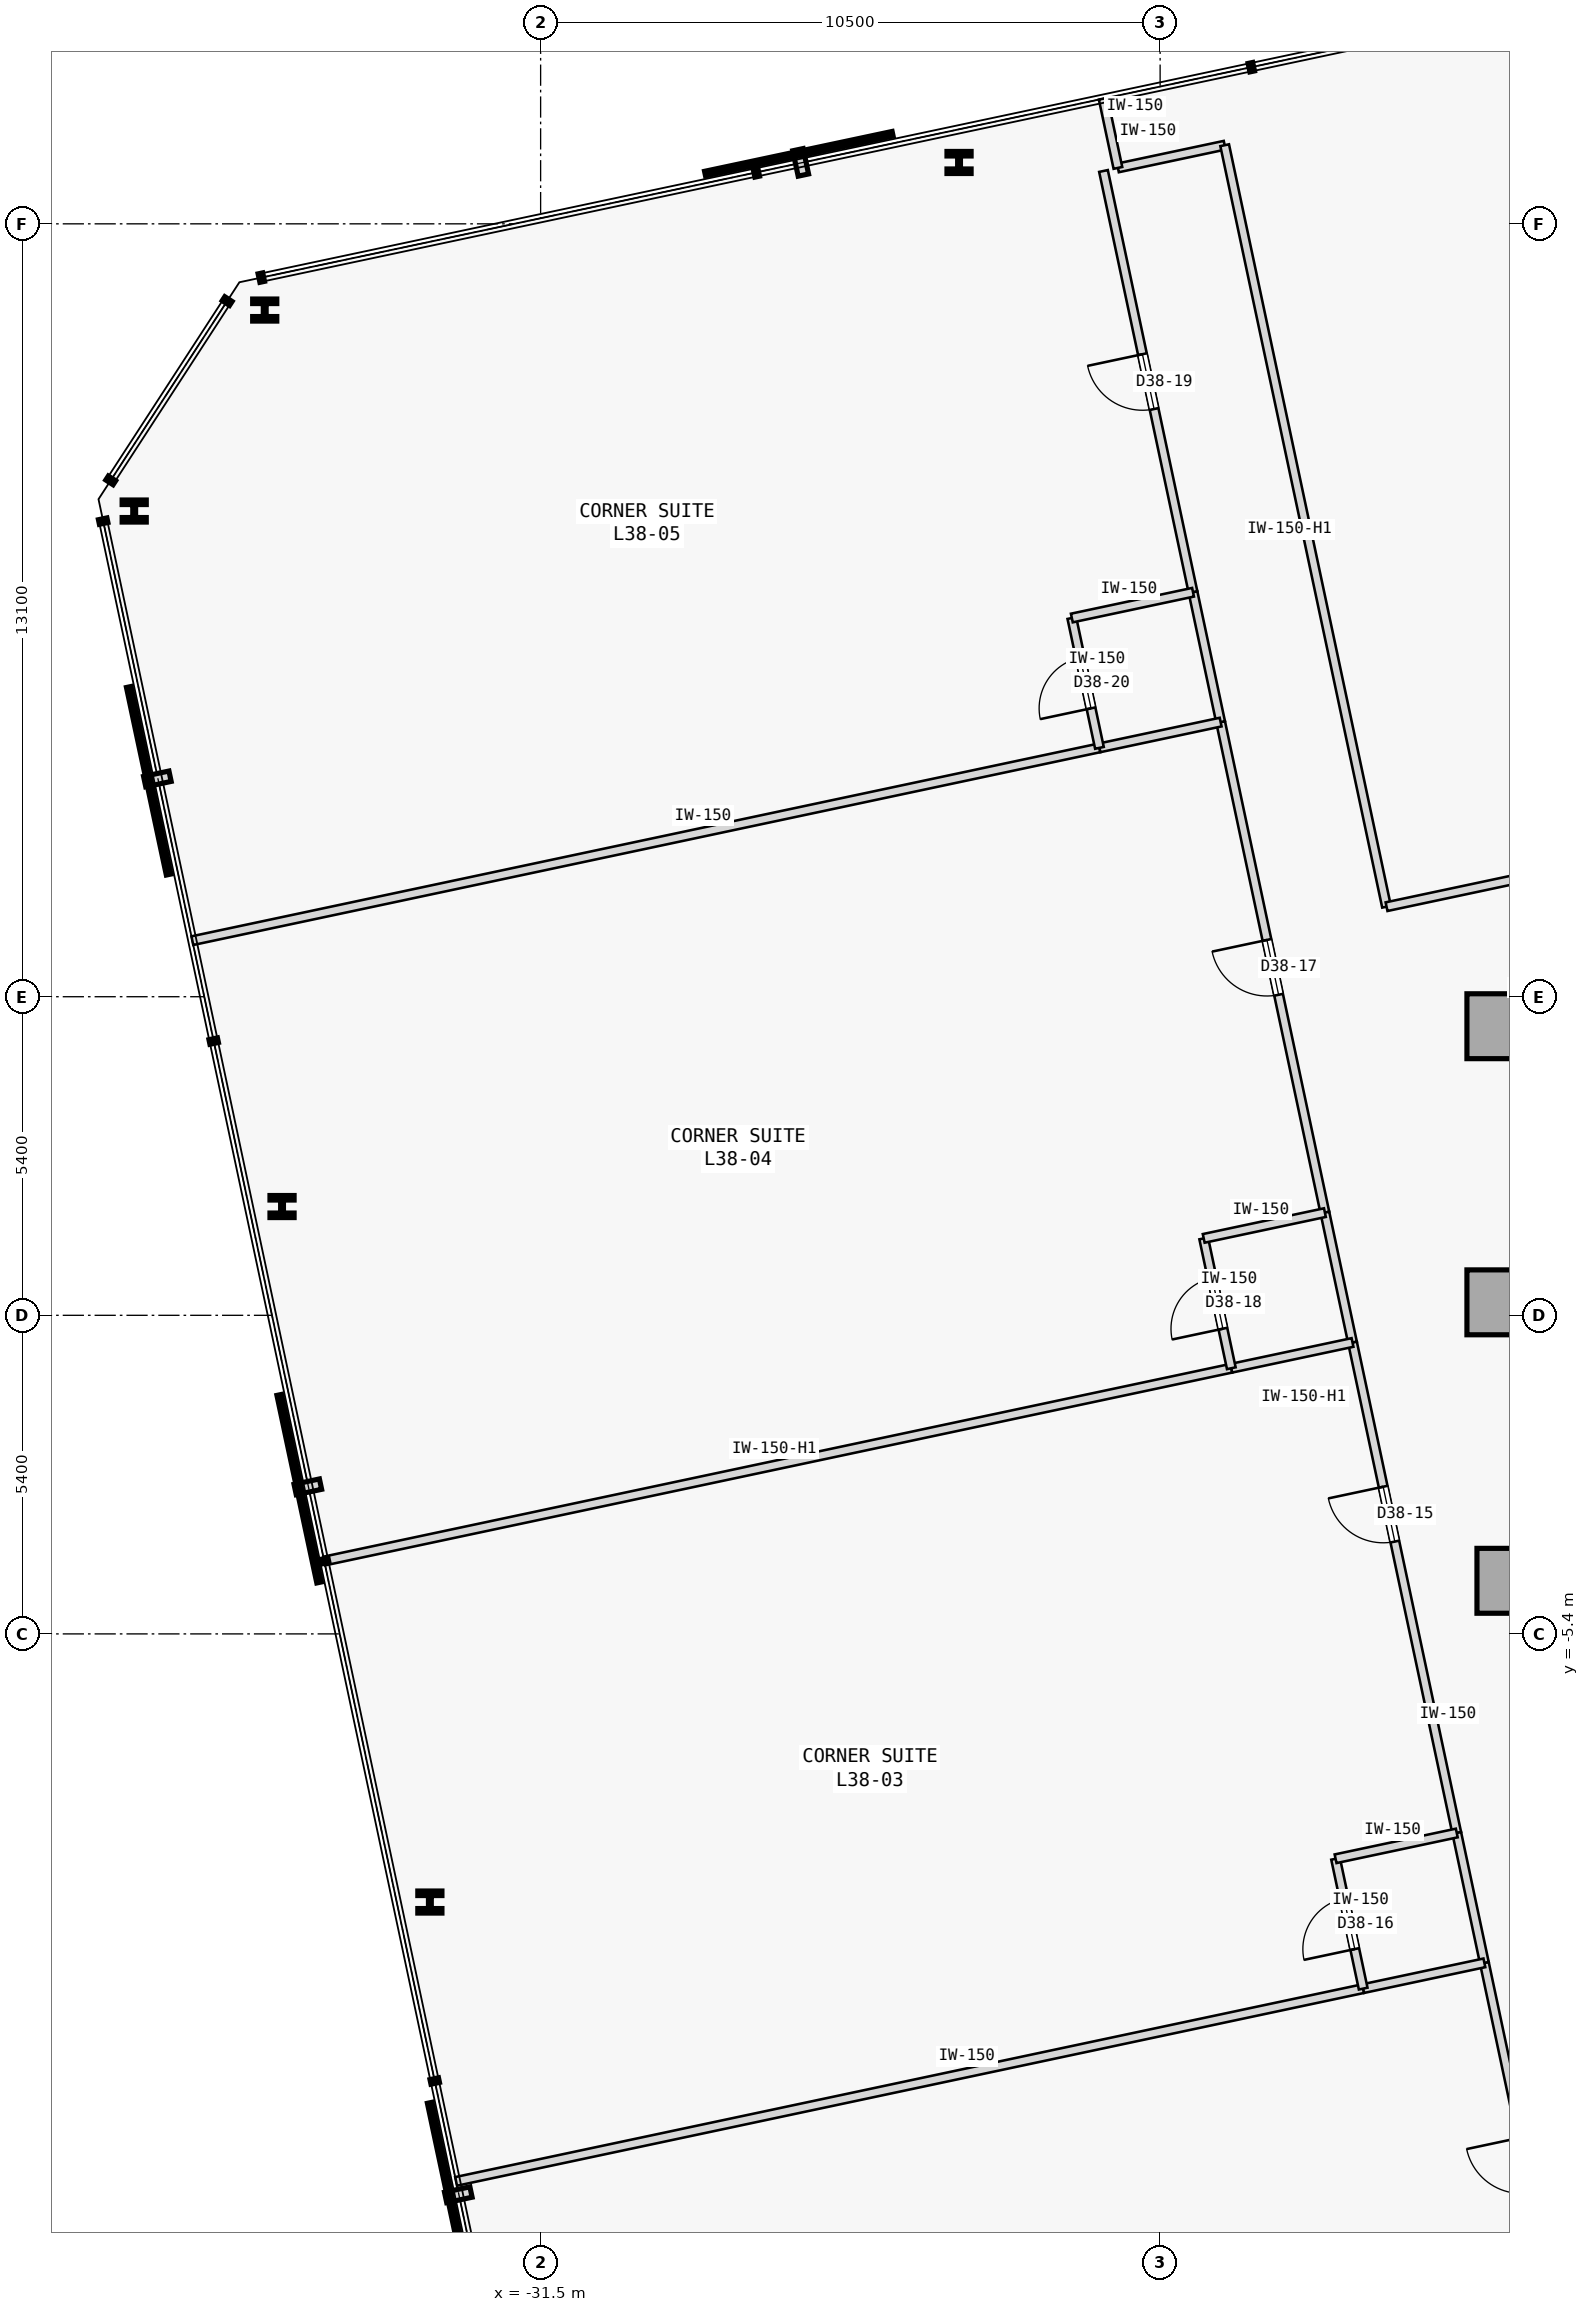
"""IFC4 building model, lengths in metres.
Left out: names, types, materials, properties, quantities, classifications, styles, units other than length and angle.
Written with IfcOpenShell. Run it as: python <this file> out.ifc"""

import sys

from ifc_helpers import new_model, si_unit, direction, frame, frame_2d, origin, origin_2d, place, context, subcontext, project, spatial, rectangle, i_section, extrude, element, fill, save


model = new_model("IFC4")
c1 = context("Model", 3, precision=1e-05, world=origin(), true_north=direction((0.0, 1.0)))
c2 = subcontext(c1, "Body", "Model", "MODEL_VIEW")
j1 = project(units=[si_unit("LENGTHUNIT", "METRE"), si_unit("PLANEANGLEUNIT", "RADIAN")], contexts=[c1])
p1 = place(None, origin())
s1 = spatial("IfcSite", under=j1, at=p1, CompositionType="ELEMENT")
p2 = place(p1, origin())
s2 = spatial("IfcBuilding", under=s1, at=p2, CompositionType="ELEMENT")
p3 = place(p2, frame((0.0, 0.0, 151.4)))
s3 = spatial("IfcBuildingStorey", under=s2, at=p3, CompositionType="ELEMENT", Elevation=151.4)
for number, where, z_axis, x_axis in (
    (1, (-15.25, 4.9, 0.0), (0.0, 0.0, 1.0), (1.0, 0.0, 0.0)),
    (2, (-15.25, 0.22, 0.0), (0.0, 0.0, 1.0), (1.0, 0.0, 0.0)),
    (3, (-15.08, -4.5, 0.0), (0.0, 0.0, 1.0), (1.0, 0.0, 0.0)),
):
    element("IfcColumn", number, at=place(p3, frame(where, z_axis=z_axis, x_axis=x_axis)), inside=s3, PredefinedType="COLUMN", context=c2, shape_type="SweptSolid", body=[
        extrude(rectangle(XDim=1.1, YDim=1.1, at=origin_2d()), origin(), (0.0, 0.0, 1.0), 3.4),
    ])
for number, where, z_axis, x_axis in (
    (4, (-24.408, 19.54, 0.0), (0.0, 0.0, 1.0), (1.0, 0.0, 0.0)),
    (5, (-36.176, 17.039, 0.0), (0.0, 0.0, 1.0), (1.0, 0.0, 0.0)),
    (6, (-38.389, 13.632, 0.0), (0.0, 0.0, 1.0), (1.0, 0.0, 0.0)),
    (7, (-35.883, 1.844, 0.0), (0.0, 0.0, 1.0), (1.0, 0.0, 0.0)),
    (8, (-33.377, -9.945, 0.0), (0.0, 0.0, 1.0), (1.0, 0.0, 0.0)),
):
    element("IfcColumn", number, at=place(p3, frame(where, z_axis=z_axis, x_axis=x_axis)), inside=s3, PredefinedType="COLUMN", context=c2, shape_type="SweptSolid", body=[
        extrude(i_section(OverallWidth=0.409, OverallDepth=0.374, WebThickness=0.048, FlangeThickness=0.077, FilletRadius=0.015, at=origin_2d()), origin(), (0.0, 0.0, 1.0), 3.4),
    ])
p4 = place(p3, frame((-21.715, 19.448, 0.0), z_axis=(0.0, 0.0, 1.0), x_axis=(0.978160192495, 0.207852442415, 0.0)))
e9 = element("IfcWall", 9, at=p4, inside=s3, PredefinedType="PARTITIONING", context=c2, shape_type="SweptSolid", body=[
    extrude(rectangle(XDim=1.85, YDim=0.15, at=frame_2d((0.925, 0.0))), origin(), (0.0, 0.0, 1.0), 3.175),
])
p5 = place(p3, frame((-17.162, 6.926, 0.0), z_axis=(0.0, 0.0, 1.0), x_axis=(-0.207911421929, 0.978147657888, 0.0)))
e10 = element("IfcWall", 10, at=p5, inside=s3, PredefinedType="PARTITIONING", context=c2, shape_type="SweptSolid", body=[
    extrude(rectangle(XDim=13.195, YDim=0.15, at=frame_2d((6.598, 0.0))), origin(), (0.0, 0.0, 1.0), 2.725),
])
p6 = place(p3, frame((-17.162, 6.926, 0.0), z_axis=(0.0, 0.0, 1.0), x_axis=(0.978145870853, 0.207919829103, 0.0)))
e11 = element("IfcWall", 11, at=p6, inside=s3, PredefinedType="PARTITIONING", context=c2, shape_type="SweptSolid", body=[
    extrude(rectangle(XDim=15.347, YDim=0.15, at=frame_2d((7.673, 0.0))), origin(), (0.0, 0.0, 1.0), 3.175),
])
p7 = place(p6, frame((7.213, 0.0, 0.0)))
e12 = element("IfcOpeningElement", 12, at=p7, cuts=e11, PredefinedType="OPENING", context=c2, shape_type="SweptSolid", body=[
    extrude(rectangle(XDim=0.92, YDim=2.15, at=frame_2d((0.46, 1.075))), frame((0.0, 0.085, 0.0), z_axis=(0.0, -1.0, 0.0), x_axis=(1.0, 0.0, 0.0)), (0.0, 0.0, 1.0), 0.17),
])
p8 = place(p3, frame((-14.049, -17.823, 0.0), z_axis=(0.0, 0.0, 1.0), x_axis=(-0.207940096132, 0.978141562567, 0.0)))
e13 = element("IfcWall", 13, at=p8, inside=s3, PredefinedType="PARTITIONING", context=c2, shape_type="SweptSolid", body=[
    extrude(rectangle(XDim=7.0, YDim=0.15, at=frame_2d((3.5, 0.0))), origin(), (0.0, 0.0, 1.0), 3.175),
])
p9 = place(p8, frame((3.025, 0.0, 0.0)))
e14 = element("IfcOpeningElement", 14, at=p9, cuts=e13, PredefinedType="OPENING", context=c2, shape_type="SweptSolid", body=[
    extrude(rectangle(XDim=0.95, YDim=2.15, at=frame_2d((0.475, 1.075))), frame((0.0, 0.085, 0.0), z_axis=(0.0, -1.0, 0.0), x_axis=(1.0, 0.0, 0.0)), (0.0, 0.0, 1.0), 0.17),
])
p10 = place(p3, frame((-15.972, -8.775, 0.0), z_axis=(0.0, 0.0, 1.0), x_axis=(-0.207894825434, 0.97815118543, 0.0)))
e15 = element("IfcWall", 15, at=p10, inside=s3, PredefinedType="PARTITIONING", context=c2, shape_type="SweptSolid", body=[
    extrude(rectangle(XDim=8.5, YDim=0.15, at=frame_2d((4.25, 0.0))), origin(), (0.0, 0.0, 1.0), 3.175),
])
p11 = place(p10, frame((5.05, 0.0, 0.0)))
e16 = element("IfcOpeningElement", 16, at=p11, cuts=e15, PredefinedType="OPENING", context=c2, shape_type="SweptSolid", body=[
    extrude(rectangle(XDim=0.95, YDim=2.15, at=frame_2d((0.475, 1.075))), frame((0.0, 0.085, 0.0), z_axis=(0.0, -1.0, 0.0), x_axis=(1.0, 0.0, 0.0)), (0.0, 0.0, 1.0), 0.17),
])
p12 = place(p3, frame((-15.504, -10.976, 0.0), z_axis=(0.0, 0.0, 1.0), x_axis=(-0.207891197838, 0.978151956427, 0.0)))
e17 = element("IfcWall", 17, at=p12, inside=s3, PredefinedType="PARTITIONING", context=c2, shape_type="SweptSolid", body=[
    extrude(rectangle(XDim=2.25, YDim=0.15, at=frame_2d((1.125, 0.0))), origin(), (0.0, 0.0, 1.0), 3.175),
])
p13 = place(p3, frame((-18.207, 1.74, 0.0), z_axis=(0.0, 0.0, 1.0), x_axis=(-0.207922306475, 0.978145344246, 0.0)))
e18 = element("IfcWall", 18, at=p13, inside=s3, PredefinedType="PARTITIONING", context=c2, shape_type="SweptSolid", body=[
    extrude(rectangle(XDim=8.5, YDim=0.15, at=frame_2d((4.25, 0.0))), origin(), (0.0, 0.0, 1.0), 3.175),
])
p14 = place(p13, frame((3.775, 0.0, 0.0)))
e19 = element("IfcOpeningElement", 19, at=p14, cuts=e18, PredefinedType="OPENING", context=c2, shape_type="SweptSolid", body=[
    extrude(rectangle(XDim=0.95, YDim=2.15, at=frame_2d((0.475, 1.075))), frame((0.0, 0.085, 0.0), z_axis=(0.0, -1.0, 0.0), x_axis=(1.0, 0.0, 0.0)), (0.0, 0.0, 1.0), 0.17),
])
p15 = place(p3, frame((-17.739, -0.46, 0.0), z_axis=(0.0, 0.0, 1.0), x_axis=(-0.207891197838, 0.978151956427, 0.0)))
e20 = element("IfcWall", 20, at=p15, inside=s3, PredefinedType="PARTITIONING", context=c2, shape_type="SweptSolid", body=[
    extrude(rectangle(XDim=2.25, YDim=0.15, at=frame_2d((1.125, 0.0))), origin(), (0.0, 0.0, 1.0), 3.175),
])
p16 = place(p3, frame((-20.442, 12.255, 0.0), z_axis=(0.0, 0.0, 1.0), x_axis=(-0.207916352354, 0.978146609882, 0.0)))
e21 = element("IfcWall", 21, at=p16, inside=s3, PredefinedType="PARTITIONING", context=c2, shape_type="SweptSolid", body=[
    extrude(rectangle(XDim=7.3, YDim=0.15, at=frame_2d((3.65, 0.0))), origin(), (0.0, 0.0, 1.0), 3.175),
])
p17 = place(p16, frame((3.175, 0.0, 0.0)))
e22 = element("IfcOpeningElement", 22, at=p17, cuts=e21, PredefinedType="OPENING", context=c2, shape_type="SweptSolid", body=[
    extrude(rectangle(XDim=0.95, YDim=2.15, at=frame_2d((0.475, 1.075))), frame((0.0, 0.085, 0.0), z_axis=(0.0, -1.0, 0.0), x_axis=(1.0, 0.0, 0.0)), (0.0, 0.0, 1.0), 0.17),
])
p18 = place(p3, frame((-19.974, 10.055, 0.0), z_axis=(0.0, 0.0, 1.0), x_axis=(-0.207913264065, 0.978147266328, 0.0)))
e23 = element("IfcWall", 23, at=p18, inside=s3, PredefinedType="PARTITIONING", context=c2, shape_type="SweptSolid", body=[
    extrude(rectangle(XDim=2.25, YDim=0.15, at=frame_2d((1.125, 0.0))), origin(), (0.0, 0.0, 1.0), 3.175),
])
p19 = place(p3, frame((-21.715, 19.448, 0.0), z_axis=(0.0, 0.0, 1.0), x_axis=(-0.20795853359, 0.978137642823, 0.0)))
e24 = element("IfcWall", 24, at=p19, inside=s3, PredefinedType="PARTITIONING", context=c2, shape_type="SweptSolid", body=[
    extrude(rectangle(XDim=1.2, YDim=0.15, at=frame_2d((0.6, 0.0))), origin(), (0.0, 0.0, 1.0), 3.175),
])
p20 = place(p3, frame((-32.933, -14.68, 0.0), z_axis=(0.0, 0.0, 1.0), x_axis=(0.978146137903, 0.207918572776, 0.0)))
e25 = element("IfcWall", 25, at=p20, inside=s3, PredefinedType="PARTITIONING", context=c2, shape_type="SweptSolid", body=[
    extrude(rectangle(XDim=15.718, YDim=0.15, at=frame_2d((7.859, 0.0))), origin(), (0.0, 0.0, 1.0), 3.175),
])
p21 = place(p3, frame((-17.558, -11.412, 0.0), z_axis=(0.0, 0.0, 1.0), x_axis=(0.978153236239, 0.207885176084, 0.0)))
e26 = element("IfcWall", 26, at=p21, inside=s3, PredefinedType="PARTITIONING", context=c2, shape_type="SweptSolid", body=[
    extrude(rectangle(XDim=2.1, YDim=0.15, at=frame_2d((1.05, 0.0))), origin(), (0.0, 0.0, 1.0), 3.175),
])
p22 = place(p3, frame((-17.558, -11.412, 0.0), z_axis=(0.0, 0.0, 1.0), x_axis=(-0.207891197838, 0.978151956427, 0.0)))
e27 = element("IfcWall", 27, at=p22, inside=s3, PredefinedType="PARTITIONING", context=c2, shape_type="SweptSolid", body=[
    extrude(rectangle(XDim=2.25, YDim=0.15, at=frame_2d((1.125, 0.0))), origin(), (0.0, 0.0, 1.0), 3.175),
])
p23 = place(p22, frame((0.685, 0.0, 0.0)))
e28 = element("IfcOpeningElement", 28, at=p23, cuts=e27, PredefinedType="OPENING", context=c2, shape_type="SweptSolid", body=[
    extrude(rectangle(XDim=0.88, YDim=2.15, at=frame_2d((0.44, 1.075))), frame((0.0, 0.085, 0.0), z_axis=(0.0, -1.0, 0.0), x_axis=(1.0, 0.0, 0.0)), (0.0, 0.0, 1.0), 0.17),
])
p24 = place(p3, frame((-18.026, -9.211, 0.0), z_axis=(0.0, 0.0, 1.0), x_axis=(0.978153236239, 0.207885176084, 0.0)))
e29 = element("IfcWall", 29, at=p24, inside=s3, PredefinedType="PARTITIONING", context=c2, shape_type="SweptSolid", body=[
    extrude(rectangle(XDim=2.1, YDim=0.15, at=frame_2d((1.05, 0.0))), origin(), (0.0, 0.0, 1.0), 3.175),
])
p25 = place(p3, frame((-35.168, -4.165, 0.0), z_axis=(0.0, 0.0, 1.0), x_axis=(0.978149296727, 0.207903711638, 0.0)))
e30 = element("IfcWall", 30, at=p25, inside=s3, PredefinedType="PARTITIONING", context=c2, shape_type="SweptSolid", body=[
    extrude(rectangle(XDim=15.718, YDim=0.15, at=frame_2d((7.859, 0.0))), origin(), (0.0, 0.0, 1.0), 2.725),
])
p26 = place(p3, frame((-19.793, -0.897, 0.0), z_axis=(0.0, 0.0, 1.0), x_axis=(0.978134617382, 0.207972763311, 0.0)))
e31 = element("IfcWall", 31, at=p26, inside=s3, PredefinedType="PARTITIONING", context=c2, shape_type="SweptSolid", body=[
    extrude(rectangle(XDim=2.1, YDim=0.15, at=frame_2d((1.05, 0.0))), origin(), (0.0, 0.0, 1.0), 2.725),
])
p27 = place(p3, frame((-19.793, -0.897, 0.0), z_axis=(0.0, 0.0, 1.0), x_axis=(-0.207891197838, 0.978151956427, 0.0)))
e32 = element("IfcWall", 32, at=p27, inside=s3, PredefinedType="PARTITIONING", context=c2, shape_type="SweptSolid", body=[
    extrude(rectangle(XDim=2.25, YDim=0.15, at=frame_2d((1.125, 0.0))), origin(), (0.0, 0.0, 1.0), 3.175),
])
p28 = place(p27, frame((0.685, 0.0, 0.0)))
e33 = element("IfcOpeningElement", 33, at=p28, cuts=e32, PredefinedType="OPENING", context=c2, shape_type="SweptSolid", body=[
    extrude(rectangle(XDim=0.88, YDim=2.15, at=frame_2d((0.44, 1.075))), frame((0.0, 0.085, 0.0), z_axis=(0.0, -1.0, 0.0), x_axis=(1.0, 0.0, 0.0)), (0.0, 0.0, 1.0), 0.17),
])
p29 = place(p3, frame((-20.261, 1.304, 0.0), z_axis=(0.0, 0.0, 1.0), x_axis=(0.978134617382, 0.207972763311, 0.0)))
e34 = element("IfcWall", 34, at=p29, inside=s3, PredefinedType="PARTITIONING", context=c2, shape_type="SweptSolid", body=[
    extrude(rectangle(XDim=2.1, YDim=0.15, at=frame_2d((1.05, 0.0))), origin(), (0.0, 0.0, 1.0), 3.175),
])
p30 = place(p3, frame((-37.403, 6.35, 0.0), z_axis=(0.0, 0.0, 1.0), x_axis=(0.978149296727, 0.207903711638, 0.0)))
e35 = element("IfcWall", 35, at=p30, inside=s3, PredefinedType="PARTITIONING", context=c2, shape_type="SweptSolid", body=[
    extrude(rectangle(XDim=15.718, YDim=0.15, at=frame_2d((7.859, 0.0))), origin(), (0.0, 0.0, 1.0), 3.175),
])
p31 = place(p3, frame((-22.029, 9.618, 0.0), z_axis=(0.0, 0.0, 1.0), x_axis=(0.978134617382, 0.207972763311, 0.0)))
e36 = element("IfcWall", 36, at=p31, inside=s3, PredefinedType="PARTITIONING", context=c2, shape_type="SweptSolid", body=[
    extrude(rectangle(XDim=2.1, YDim=0.15, at=frame_2d((1.05, 0.0))), origin(), (0.0, 0.0, 1.0), 3.175),
])
p32 = place(p3, frame((-22.029, 9.618, 0.0), z_axis=(0.0, 0.0, 1.0), x_axis=(-0.207891197838, 0.978151956427, 0.0)))
e37 = element("IfcWall", 37, at=p32, inside=s3, PredefinedType="PARTITIONING", context=c2, shape_type="SweptSolid", body=[
    extrude(rectangle(XDim=2.25, YDim=0.15, at=frame_2d((1.125, 0.0))), origin(), (0.0, 0.0, 1.0), 3.175),
])
p33 = place(p32, frame((0.685, 0.0, 0.0)))
e38 = element("IfcOpeningElement", 38, at=p33, cuts=e37, PredefinedType="OPENING", context=c2, shape_type="SweptSolid", body=[
    extrude(rectangle(XDim=0.88, YDim=2.15, at=frame_2d((0.44, 1.075))), frame((0.0, 0.085, 0.0), z_axis=(0.0, -1.0, 0.0), x_axis=(1.0, 0.0, 0.0)), (0.0, 0.0, 1.0), 0.17),
])
p34 = place(p3, frame((-22.496, 11.819, 0.0), z_axis=(0.0, 0.0, 1.0), x_axis=(0.97815826, 0.207861536591, 0.0)))
e39 = element("IfcWall", 39, at=p34, inside=s3, PredefinedType="PARTITIONING", context=c2, shape_type="SweptSolid", body=[
    extrude(rectangle(XDim=2.1, YDim=0.15, at=frame_2d((1.05, 0.0))), origin(), (0.0, 0.0, 1.0), 3.175),
])
p35 = place(p11, origin())
e40 = element("IfcDoor", 40, at=p35, inside=s3, OperationType="SINGLE_SWING_RIGHT", PredefinedType="DOOR", context=c2, shape_type="SweptSolid", body=[
    extrude(rectangle(XDim=0.95, YDim=2.15, at=frame_2d((0.475, 1.075))), frame((0.0, 0.025, 0.0), z_axis=(0.0, -1.0, 0.0), x_axis=(1.0, 0.0, 0.0)), (0.0, 0.0, 1.0), 0.05),
])
fill(e16, e40)
p36 = place(p23, origin())
e41 = element("IfcDoor", 41, at=p36, inside=s3, OperationType="SINGLE_SWING_LEFT", PredefinedType="DOOR", context=c2, shape_type="SweptSolid", body=[
    extrude(rectangle(XDim=0.88, YDim=2.15, at=frame_2d((0.44, 1.075))), frame((0.0, 0.025, 0.0), z_axis=(0.0, -1.0, 0.0), x_axis=(1.0, 0.0, 0.0)), (0.0, 0.0, 1.0), 0.05),
])
fill(e28, e41)
p37 = place(p14, origin())
e42 = element("IfcDoor", 42, at=p37, inside=s3, OperationType="SINGLE_SWING_RIGHT", PredefinedType="DOOR", context=c2, shape_type="SweptSolid", body=[
    extrude(rectangle(XDim=0.95, YDim=2.15, at=frame_2d((0.475, 1.075))), frame((0.0, 0.025, 0.0), z_axis=(0.0, -1.0, 0.0), x_axis=(1.0, 0.0, 0.0)), (0.0, 0.0, 1.0), 0.05),
])
fill(e19, e42)
p38 = place(p28, origin())
e43 = element("IfcDoor", 43, at=p38, inside=s3, OperationType="SINGLE_SWING_LEFT", PredefinedType="DOOR", context=c2, shape_type="SweptSolid", body=[
    extrude(rectangle(XDim=0.88, YDim=2.15, at=frame_2d((0.44, 1.075))), frame((0.0, 0.025, 0.0), z_axis=(0.0, -1.0, 0.0), x_axis=(1.0, 0.0, 0.0)), (0.0, 0.0, 1.0), 0.05),
])
fill(e33, e43)
p39 = place(p17, origin())
e44 = element("IfcDoor", 44, at=p39, inside=s3, OperationType="SINGLE_SWING_RIGHT", PredefinedType="DOOR", context=c2, shape_type="SweptSolid", body=[
    extrude(rectangle(XDim=0.95, YDim=2.15, at=frame_2d((0.475, 1.075))), frame((0.0, 0.025, 0.0), z_axis=(0.0, -1.0, 0.0), x_axis=(1.0, 0.0, 0.0)), (0.0, 0.0, 1.0), 0.05),
])
fill(e22, e44)
p40 = place(p33, origin())
e45 = element("IfcDoor", 45, at=p40, inside=s3, OperationType="SINGLE_SWING_LEFT", PredefinedType="DOOR", context=c2, shape_type="SweptSolid", body=[
    extrude(rectangle(XDim=0.88, YDim=2.15, at=frame_2d((0.44, 1.075))), frame((0.0, 0.025, 0.0), z_axis=(0.0, -1.0, 0.0), x_axis=(1.0, 0.0, 0.0)), (0.0, 0.0, 1.0), 0.05),
])
fill(e38, e45)
save(model, sys.argv[1])
